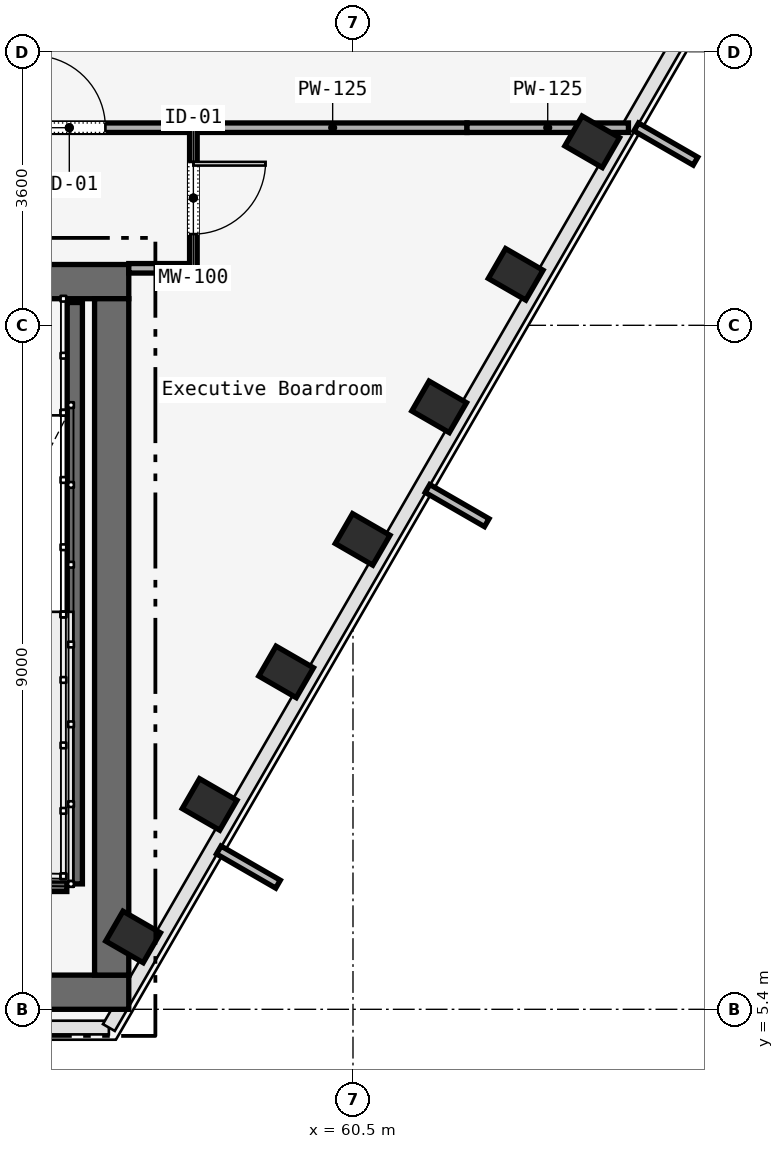
"""IFC4 building model, lengths in metres.
Left out: names, types, materials, properties, quantities, classifications, styles, units other than length and angle.
Written with IfcOpenShell. Run it as: python <this file> out.ifc"""

import sys

from ifc_helpers import new_model, si_unit, direction, frame, frame_2d, origin, origin_2d, place, context, subcontext, project, spatial, rectangle, i_section, extrude, element, fill, save


model = new_model("IFC4")
c1 = context("Model", 3, precision=1e-05, world=origin(), true_north=direction((0.0, 1.0)))
c2 = subcontext(c1, "Body", "Model", "MODEL_VIEW")
j1 = project(units=[si_unit("LENGTHUNIT", "METRE"), si_unit("PLANEANGLEUNIT", "RADIAN")], contexts=[c1])
p1 = place(None, origin())
s1 = spatial("IfcSite", under=j1, at=p1, CompositionType="ELEMENT")
p2 = place(p1, origin())
s2 = spatial("IfcBuilding", under=s1, at=p2, CompositionType="ELEMENT")
p3 = place(p2, frame((0.0, 0.0, 36.0)))
s3 = spatial("IfcBuildingStorey", under=s2, at=p3, CompositionType="ELEMENT", Elevation=36.0)
p4 = place(p3, frame((26.45, 14.975, 0.0), z_axis=(0.0, 0.0, 1.0), x_axis=(1.0, 0.0, 0.0)))
e1 = element("IfcWall", 1, at=p4, inside=s3, PredefinedType="SOLIDWALL", context=c2, shape_type="SweptSolid", body=[
    extrude(rectangle(XDim=31.1, YDim=0.45, at=frame_2d((15.55, 0.0))), origin(), (0.0, 0.0, 1.0), 3.58),
])
p5 = place(p4, frame((1.65, 0.0, 0.0)))
e2 = element("IfcOpeningElement", 2, at=p5, cuts=e1, PredefinedType="OPENING", context=c2, shape_type="SweptSolid", body=[
    extrude(rectangle(XDim=1.1, YDim=2.2, at=frame_2d((0.55, 1.1))), frame((0.0, 0.225, 0.0), z_axis=(0.0, -1.0, 0.0), x_axis=(1.0, 0.0, 0.0)), (0.0, 0.0, 1.0), 0.45),
])
p6 = place(p4, frame((13.65, 0.0, 0.0)))
e3 = element("IfcOpeningElement", 3, at=p6, cuts=e1, PredefinedType="OPENING", context=c2, shape_type="SweptSolid", body=[
    extrude(rectangle(XDim=1.1, YDim=2.2, at=frame_2d((0.55, 1.1))), frame((0.0, 0.225, 0.0), z_axis=(0.0, -1.0, 0.0), x_axis=(1.0, 0.0, 0.0)), (0.0, 0.0, 1.0), 0.45),
])
p7 = place(p4, frame((25.55, 0.0, 0.0)))
e4 = element("IfcOpeningElement", 4, at=p7, cuts=e1, PredefinedType="OPENING", context=c2, shape_type="SweptSolid", body=[
    extrude(rectangle(XDim=1.1, YDim=2.2, at=frame_2d((0.55, 1.1))), frame((0.0, 0.225, 0.0), z_axis=(0.0, -1.0, 0.0), x_axis=(1.0, 0.0, 0.0)), (0.0, 0.0, 1.0), 0.45),
])
p8 = place(p4, frame((10.7, 0.0, 0.0)))
e5 = element("IfcOpeningElement", 5, at=p8, cuts=e1, PredefinedType="OPENING", context=c2, shape_type="SweptSolid", body=[
    extrude(rectangle(XDim=1.4, YDim=2.2, at=frame_2d((0.7, 1.1))), frame((0.0, 0.225, 0.0), z_axis=(0.0, -1.0, 0.0), x_axis=(1.0, 0.0, 0.0)), (0.0, 0.0, 1.0), 0.45),
])
p9 = place(p4, frame((19.35, 0.0, 0.0)))
e6 = element("IfcOpeningElement", 6, at=p9, cuts=e1, PredefinedType="OPENING", context=c2, shape_type="SweptSolid", body=[
    extrude(rectangle(XDim=1.1, YDim=2.2, at=frame_2d((0.55, 1.1))), frame((0.0, 0.225, 0.0), z_axis=(0.0, -1.0, 0.0), x_axis=(1.0, 0.0, 0.0)), (0.0, 0.0, 1.0), 0.45),
])
p10 = place(p4, frame((21.4, 0.0, 0.0)))
e7 = element("IfcOpeningElement", 7, at=p10, cuts=e1, PredefinedType="OPENING", context=c2, shape_type="SweptSolid", body=[
    extrude(rectangle(XDim=0.9, YDim=2.1, at=frame_2d((0.45, 1.05))), frame((0.0, 0.225, 0.0), z_axis=(0.0, -1.0, 0.0), x_axis=(1.0, 0.0, 0.0)), (0.0, 0.0, 1.0), 0.45),
])
p11 = place(p4, frame((23.35, 0.0, 0.0)))
e8 = element("IfcOpeningElement", 8, at=p11, cuts=e1, PredefinedType="OPENING", context=c2, shape_type="SweptSolid", body=[
    extrude(rectangle(XDim=1.3, YDim=2.3, at=frame_2d((0.65, 1.15))), frame((0.0, 0.225, 0.0), z_axis=(0.0, -1.0, 0.0), x_axis=(1.0, 0.0, 0.0)), (0.0, 0.0, 1.0), 0.45),
])
p12 = place(p3, frame((26.45, 5.625, 0.0), z_axis=(0.0, 0.0, 1.0), x_axis=(1.0, 0.0, 0.0)))
e9 = element("IfcWall", 9, at=p12, inside=s3, PredefinedType="SOLIDWALL", context=c2, shape_type="SweptSolid", body=[
    extrude(rectangle(XDim=31.1, YDim=0.45, at=frame_2d((15.55, 0.0))), origin(), (0.0, 0.0, 1.0), 3.58),
])
p13 = place(p3, frame((57.325, 5.85, 0.0), z_axis=(0.0, 0.0, 1.0), x_axis=(0.0, 1.0, 0.0)))
e10 = element("IfcWall", 10, at=p13, inside=s3, PredefinedType="SOLIDWALL", context=c2, shape_type="SweptSolid", body=[
    extrude(rectangle(XDim=8.9, YDim=0.45, at=frame_2d((4.45, 0.0))), origin(), (0.0, 0.0, 1.0), 3.58),
])
for number, where, z_axis, x_axis in (
    (11, (57.607, 6.352, 0.0), (0.0, 0.0, 1.0), (0.5, 0.866, 0.0)),
    (12, (58.614, 8.096, 0.0), (0.0, 0.0, 1.0), (0.5, 0.866, 0.0)),
    (13, (59.62, 9.839, 0.0), (0.0, 0.0, 1.0), (0.5, 0.866, 0.0)),
    (14, (60.627, 11.583, 0.0), (0.0, 0.0, 1.0), (0.5, 0.866, 0.0)),
    (15, (61.634, 13.327, 0.0), (0.0, 0.0, 1.0), (0.5, 0.866, 0.0)),
    (16, (62.641, 15.071, 0.0), (0.0, 0.0, 1.0), (0.5, 0.866, 0.0)),
    (17, (63.647, 16.814, 0.0), (0.0, 0.0, 1.0), (0.5, 0.866, 0.0)),
):
    element("IfcColumn", number, at=place(p3, frame(where, z_axis=z_axis, x_axis=x_axis)), inside=s3, PredefinedType="COLUMN", context=c2, shape_type="SweptSolid", body=[
        extrude(i_section(OverallWidth=0.454, OverallDepth=0.569, WebThickness=0.078, FlangeThickness=0.08, FilletRadius=0.015, at=origin_2d()), origin(), (0.0, 0.0, 1.0), 3.58),
    ])
p14 = place(p3, frame((56.84, 14.7, 0.0), z_axis=(0.0, 0.0, 1.0), x_axis=(0.0, -1.0, 0.0)))
e18 = element("IfcWall", 18, at=p14, inside=s3, PredefinedType="SOLIDWALL", context=c2, shape_type="SweptSolid", body=[
    extrude(rectangle(XDim=7.65, YDim=0.2, at=frame_2d((3.825, 0.0))), origin(), (0.0, 0.0, 1.0), 3.8),
])
p15 = place(p3, frame((53.62, 7.05, 0.0), z_axis=(0.0, 0.0, 1.0), x_axis=(1.0, 0.0, 0.0)))
e19 = element("IfcWall", 19, at=p15, inside=s3, PredefinedType="SOLIDWALL", context=c2, shape_type="SweptSolid", body=[
    extrude(rectangle(XDim=3.115, YDim=0.2, at=frame_2d((1.558, 0.0))), origin(), (0.0, 0.0, 1.0), 3.8),
])
p16 = place(p3, frame((58.4, 17.0, 0.0), z_axis=(0.0, 0.0, 1.0), x_axis=(0.0, -1.0, 0.0)))
e20 = element("IfcWall", 20, at=p16, inside=s3, PredefinedType="MOVABLE", context=c2, shape_type="SweptSolid", body=[
    extrude(rectangle(XDim=1.85, YDim=0.1, at=frame_2d((0.925, 0.0))), origin(), (0.0, 0.0, 1.0), 2.933),
])
p17 = place(p16, frame((0.45, 0.0, 0.0)))
e21 = element("IfcOpeningElement", 21, at=p17, cuts=e20, PredefinedType="OPENING", context=c2, shape_type="SweptSolid", body=[
    extrude(rectangle(XDim=0.95, YDim=2.2, at=frame_2d((0.475, 1.1))), frame((0.0, 0.05, 0.0), z_axis=(0.0, -1.0, 0.0), x_axis=(1.0, 0.0, 0.0)), (0.0, 0.0, 1.0), 0.1),
])
p18 = place(p3, frame((58.335, 15.15, 0.0), z_axis=(0.0, 0.0, 1.0), x_axis=(-1.0, 0.0, 0.0)))
e22 = element("IfcWall", 22, at=p18, inside=s3, PredefinedType="PARTITIONING", context=c2, shape_type="SweptSolid", body=[
    extrude(rectangle(XDim=0.785, YDim=0.125, at=frame_2d((0.393, 0.0))), origin(), (0.0, 0.0, 1.0), 2.933),
])
p19 = place(p3, frame((55.2, 17.0, 0.0), z_axis=(0.0, 0.0, 1.0), x_axis=(1.0, 0.0, 0.0)))
e23 = element("IfcWall", 23, at=p19, inside=s3, PredefinedType="PARTITIONING", context=c2, shape_type="SweptSolid", body=[
    extrude(rectangle(XDim=3.135, YDim=0.125, at=frame_2d((1.567, 0.0))), origin(), (0.0, 0.0, 1.0), 2.933),
])
p20 = place(p19, frame((1.093, 0.0, 0.0)))
e24 = element("IfcOpeningElement", 24, at=p20, cuts=e23, PredefinedType="OPENING", context=c2, shape_type="SweptSolid", body=[
    extrude(rectangle(XDim=0.95, YDim=2.2, at=frame_2d((0.475, 1.1))), frame((0.0, 0.062, 0.0), z_axis=(0.0, -1.0, 0.0), x_axis=(1.0, 0.0, 0.0)), (0.0, 0.0, 1.0), 0.125),
])
p21 = place(p3, frame((58.465, 17.0, 0.0), z_axis=(0.0, 0.0, 1.0), x_axis=(1.0, 0.0, 0.0)))
e25 = element("IfcWall", 25, at=p21, inside=s3, PredefinedType="PARTITIONING", context=c2, shape_type="SweptSolid", body=[
    extrude(rectangle(XDim=3.535, YDim=0.125, at=frame_2d((1.768, 0.0))), origin(), (0.0, 0.0, 1.0), 2.933),
])
p22 = place(p3, frame((62.0, 17.0, 0.0), z_axis=(0.0, 0.0, 1.0), x_axis=(1.0, 0.0, 0.0)))
e26 = element("IfcWall", 26, at=p22, inside=s3, PredefinedType="PARTITIONING", context=c2, shape_type="SweptSolid", body=[
    extrude(rectangle(XDim=2.124, YDim=0.125, at=frame_2d((1.062, 0.0))), origin(), (0.0, 0.0, 1.0), 2.933),
])
p23 = place(p17, origin())
e27 = element("IfcDoor", 27, at=p23, inside=s3, OperationType="SINGLE_SWING_RIGHT", PredefinedType="DOOR", context=c2, shape_type="SweptSolid", body=[
    extrude(rectangle(XDim=0.95, YDim=2.2, at=frame_2d((0.475, 1.1))), frame((0.0, 0.025, 0.0), z_axis=(0.0, -1.0, 0.0), x_axis=(1.0, 0.0, 0.0)), (0.0, 0.0, 1.0), 0.05),
])
fill(e21, e27)
p24 = place(p20, origin())
e28 = element("IfcDoor", 28, at=p24, inside=s3, OperationType="SINGLE_SWING_LEFT", PredefinedType="DOOR", context=c2, shape_type="SweptSolid", body=[
    extrude(rectangle(XDim=0.95, YDim=2.2, at=frame_2d((0.475, 1.1))), frame((0.0, 0.025, 0.0), z_axis=(0.0, -1.0, 0.0), x_axis=(1.0, 0.0, 0.0)), (0.0, 0.0, 1.0), 0.05),
])
fill(e24, e28)
save(model, sys.argv[1])
